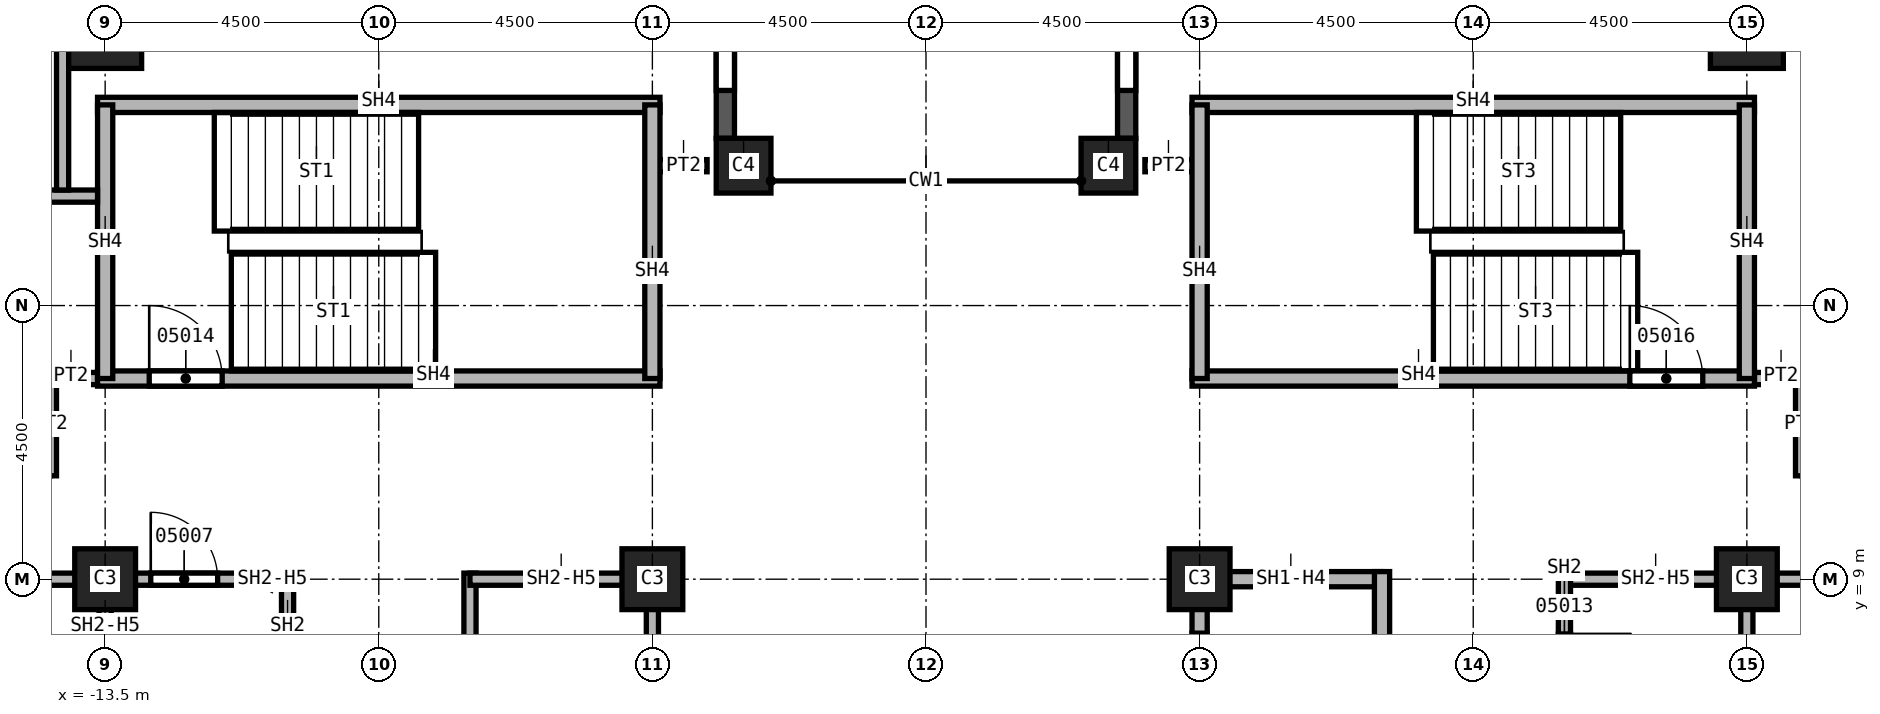
"""IFC4 building model, lengths in metres.
Left out: names, types, materials, properties, quantities, classifications, styles, units other than length and angle.
Written with IfcOpenShell. Run it as: python <this file> out.ifc"""

import sys

from ifc_helpers import new_model, si_unit, direction, frame, frame_2d, origin, origin_2d, place, context, subcontext, project, spatial, rectangle, extrude, element, fill, save


model = new_model("IFC4")
c1 = context("Model", 3, precision=1e-05, world=origin(), true_north=direction((0.0, 1.0)))
c2 = subcontext(c1, "Body", "Model", "MODEL_VIEW")
j1 = project(units=[si_unit("LENGTHUNIT", "METRE"), si_unit("PLANEANGLEUNIT", "RADIAN")], contexts=[c1])
p1 = place(None, origin())
s1 = spatial("IfcSite", under=j1, at=p1, CompositionType="ELEMENT")
p2 = place(p1, origin())
s2 = spatial("IfcBuilding", under=s1, at=p2, CompositionType="ELEMENT")
p3 = place(p2, frame((0.0, 0.0, 112.0)))
s3 = spatial("IfcBuildingStorey", under=s2, at=p3, CompositionType="ELEMENT", Elevation=112.0)
for number, where, z_axis, x_axis in (
    (1, (13.5, 18.0, 0.0), (0.0, 0.0, 1.0), (1.0, 0.0, 0.0)),
    (2, (-13.5, 18.0, 0.0), (0.0, 0.0, 1.0), (1.0, 0.0, 0.0)),
):
    element("IfcColumn", number, at=place(p3, frame(where, z_axis=z_axis, x_axis=x_axis)), inside=s3, PredefinedType="COLUMN", context=c2, shape_type="SweptSolid", body=[
        extrude(rectangle(XDim=1.2, YDim=1.2, at=origin_2d()), origin(), (0.0, 0.0, 1.0), 3.7),
    ])
for number, where, z_axis, x_axis in (
    (3, (4.5, 9.0, 0.0), (0.0, 0.0, 1.0), (1.0, 0.0, 0.0)),
    (4, (13.5, 9.0, 0.0), (0.0, 0.0, 1.0), (1.0, 0.0, 0.0)),
    (5, (-4.5, 9.0, 0.0), (0.0, 0.0, 1.0), (1.0, 0.0, 0.0)),
    (6, (-13.5, 9.0, 0.0), (0.0, 0.0, 1.0), (1.0, 0.0, 0.0)),
):
    element("IfcColumn", number, at=place(p3, frame(where, z_axis=z_axis, x_axis=x_axis)), inside=s3, PredefinedType="COLUMN", context=c2, shape_type="SweptSolid", body=[
        extrude(rectangle(XDim=1.0, YDim=1.0, at=origin_2d()), origin(), (0.0, 0.0, 1.0), 3.7),
    ])
for number, where, z_axis, x_axis in (
    (7, (3.0, 15.8, 0.0), (0.0, 0.0, 1.0), (1.0, 0.0, 0.0)),
    (8, (-3.0, 15.8, 0.0), (0.0, 0.0, 1.0), (1.0, 0.0, 0.0)),
):
    element("IfcColumn", number, at=place(p3, frame(where, z_axis=z_axis, x_axis=x_axis)), inside=s3, PredefinedType="COLUMN", context=c2, shape_type="SweptSolid", body=[
        extrude(rectangle(XDim=0.9, YDim=0.9, at=origin_2d()), origin(), (0.0, 0.0, 1.0), 3.7),
    ])
p4 = place(p3, frame((3.3, 24.2, 0.0), z_axis=(0.0, 0.0, 1.0), x_axis=(0.0, -1.0, 0.0)))
e9 = element("IfcWall", 9, at=p4, inside=s3, PredefinedType="SOLIDWALL", context=c2, shape_type="SweptSolid", body=[
    extrude(rectangle(XDim=7.95, YDim=0.3, at=frame_2d((3.975, 0.0))), origin(), (0.0, 0.0, 1.0), 3.1),
])
p5 = place(p4, frame((0.788, 0.0, 0.8)))
e10 = element("IfcOpeningElement", 10, at=p5, cuts=e9, PredefinedType="OPENING", context=c2, shape_type="SweptSolid", body=[
    extrude(rectangle(XDim=2.4, YDim=1.95, at=frame_2d((1.2, 0.975))), frame((0.0, 0.15, 0.0), z_axis=(0.0, -1.0, 0.0), x_axis=(1.0, 0.0, 0.0)), (0.0, 0.0, 1.0), 0.3),
])
p6 = place(p4, frame((4.762, 0.0, 0.8)))
e11 = element("IfcOpeningElement", 11, at=p6, cuts=e9, PredefinedType="OPENING", context=c2, shape_type="SweptSolid", body=[
    extrude(rectangle(XDim=2.4, YDim=1.95, at=frame_2d((1.2, 0.975))), frame((0.0, 0.15, 0.0), z_axis=(0.0, -1.0, 0.0), x_axis=(1.0, 0.0, 0.0)), (0.0, 0.0, 1.0), 0.3),
])
p7 = place(p3, frame((-3.3, 16.25, 0.0), z_axis=(0.0, 0.0, 1.0), x_axis=(0.0, 1.0, 0.0)))
e12 = element("IfcWall", 12, at=p7, inside=s3, PredefinedType="SOLIDWALL", context=c2, shape_type="SweptSolid", body=[
    extrude(rectangle(XDim=7.95, YDim=0.3, at=frame_2d((3.975, 0.0))), origin(), (0.0, 0.0, 1.0), 3.1),
])
p8 = place(p7, frame((0.788, 0.0, 0.8)))
e13 = element("IfcOpeningElement", 13, at=p8, cuts=e12, PredefinedType="OPENING", context=c2, shape_type="SweptSolid", body=[
    extrude(rectangle(XDim=2.4, YDim=1.95, at=frame_2d((1.2, 0.975))), frame((0.0, 0.15, 0.0), z_axis=(0.0, -1.0, 0.0), x_axis=(1.0, 0.0, 0.0)), (0.0, 0.0, 1.0), 0.3),
])
p9 = place(p7, frame((4.762, 0.0, 0.8)))
e14 = element("IfcOpeningElement", 14, at=p9, cuts=e12, PredefinedType="OPENING", context=c2, shape_type="SweptSolid", body=[
    extrude(rectangle(XDim=2.4, YDim=1.95, at=frame_2d((1.2, 0.975))), frame((0.0, 0.15, 0.0), z_axis=(0.0, -1.0, 0.0), x_axis=(1.0, 0.0, 0.0)), (0.0, 0.0, 1.0), 0.3),
])
p10 = place(p3, frame((-14.5, 12.3, 0.0), z_axis=(0.0, 0.0, 1.0), x_axis=(1.0, 0.0, 0.0)))
e15 = element("IfcWall", 15, at=p10, inside=s3, PredefinedType="PARTITIONING", context=c2, shape_type="SweptSolid", body=[
    extrude(rectangle(XDim=1.125, YDim=0.2, at=frame_2d((0.562, 0.0))), origin(), (0.0, 0.0, 1.0), 3.7),
])
p11 = place(p3, frame((-13.5, 9.0, 0.0), z_axis=(0.0, 0.0, 1.0), x_axis=(-1.0, 0.0, 0.0)))
e16 = element("IfcWall", 16, at=p11, inside=s3, PredefinedType="PARTITIONING", context=c2, shape_type="SweptSolid", body=[
    extrude(rectangle(XDim=4.5, YDim=0.2, at=frame_2d((2.25, 0.0))), origin(), (0.0, 0.0, 1.0), 3.7),
])
p12 = place(p3, frame((-14.4, 10.7, 0.0), z_axis=(0.0, 0.0, 1.0), x_axis=(0.0, 1.0, 0.0)))
e17 = element("IfcWall", 17, at=p12, inside=s3, PredefinedType="PARTITIONING", context=c2, shape_type="SweptSolid", body=[
    extrude(rectangle(XDim=1.6, YDim=0.2, at=frame_2d((0.8, 0.0))), origin(), (0.0, 0.0, 1.0), 3.7),
])
for number, where, z_axis, x_axis in (
    (18, (-4.5, 15.8, 0.0), (0.0, 0.0, 1.0), (1.0, 0.0, 0.0)),
    (19, (3.6, 15.8, 0.0), (0.0, 0.0, 1.0), (1.0, 0.0, 0.0)),
):
    element("IfcWall", number, at=place(p3, frame(where, z_axis=z_axis, x_axis=x_axis)), inside=s3, PredefinedType="PARTITIONING", context=c2, shape_type="SweptSolid", body=[
        extrude(rectangle(XDim=0.9, YDim=0.2, at=frame_2d((0.45, 0.0))), origin(), (0.0, 0.0, 1.0), 3.7),
    ])
p13 = place(p3, frame((13.375, 12.3, 0.0), z_axis=(0.0, 0.0, 1.0), x_axis=(1.0, 0.0, 0.0)))
e20 = element("IfcWall", 20, at=p13, inside=s3, PredefinedType="PARTITIONING", context=c2, shape_type="SweptSolid", body=[
    extrude(rectangle(XDim=1.125, YDim=0.2, at=frame_2d((0.562, 0.0))), origin(), (0.0, 0.0, 1.0), 3.7),
])
p14 = place(p3, frame((18.0, 9.0, 0.0), z_axis=(0.0, 0.0, 1.0), x_axis=(-1.0, 0.0, 0.0)))
e21 = element("IfcWall", 21, at=p14, inside=s3, PredefinedType="PARTITIONING", context=c2, shape_type="SweptSolid", body=[
    extrude(rectangle(XDim=4.5, YDim=0.2, at=frame_2d((2.25, 0.0))), origin(), (0.0, 0.0, 1.0), 3.7),
])
p15 = place(p3, frame((14.4, 12.3, 0.0), z_axis=(0.0, 0.0, 1.0), x_axis=(0.0, -1.0, 0.0)))
e22 = element("IfcWall", 22, at=p15, inside=s3, PredefinedType="PARTITIONING", context=c2, shape_type="SweptSolid", body=[
    extrude(rectangle(XDim=1.6, YDim=0.2, at=frame_2d((0.8, 0.0))), origin(), (0.0, 0.0, 1.0), 3.7),
])
p16 = place(p3, frame((-13.6, 9.0, 0.0), z_axis=(0.0, 0.0, 1.0), x_axis=(1.0, 0.0, 0.0)))
e23 = element("IfcWall", 23, at=p16, inside=s3, PredefinedType="SOLIDWALL", context=c2, shape_type="SweptSolid", body=[
    extrude(rectangle(XDim=3.1, YDim=0.2, at=frame_2d((1.55, 0.0))), origin(), (0.0, 0.0, 1.0), 2.938),
])
p17 = place(p16, frame((0.85, 0.0, 0.0)))
e24 = element("IfcOpeningElement", 24, at=p17, cuts=e23, PredefinedType="OPENING", context=c2, shape_type="SweptSolid", body=[
    extrude(rectangle(XDim=1.1, YDim=2.1, at=frame_2d((0.55, 1.05))), frame((0.0, 0.1, 0.0), z_axis=(0.0, -1.0, 0.0), x_axis=(1.0, 0.0, 0.0)), (0.0, 0.0, 1.0), 0.2),
])
p18 = place(p3, frame((-13.5, 7.5, 0.0), z_axis=(0.0, 0.0, 1.0), x_axis=(0.0, 1.0, 0.0)))
e25 = element("IfcWall", 25, at=p18, inside=s3, PredefinedType="SOLIDWALL", context=c2, shape_type="SweptSolid", body=[
    extrude(rectangle(XDim=1.6, YDim=0.2, at=frame_2d((0.8, 0.0))), origin(), (0.0, 0.0, 1.0), 2.938),
])
p19 = place(p3, frame((-10.5, 7.425, 0.0), z_axis=(0.0, 0.0, 1.0), x_axis=(0.0, 1.0, 0.0)))
e26 = element("IfcWall", 26, at=p19, inside=s3, PredefinedType="SOLIDWALL", context=c2, shape_type="SweptSolid", body=[
    extrude(rectangle(XDim=1.675, YDim=0.2, at=frame_2d((0.837, 0.0))), origin(), (0.0, 0.0, 1.0), 3.7),
])
p20 = place(p3, frame((-7.5, 2.875, 0.0), z_axis=(0.0, 0.0, 1.0), x_axis=(0.0, 1.0, 0.0)))
e27 = element("IfcWall", 27, at=p20, inside=s3, PredefinedType="SOLIDWALL", context=c2, shape_type="SweptSolid", body=[
    extrude(rectangle(XDim=6.225, YDim=0.2, at=frame_2d((3.113, 0.0))), origin(), (0.0, 0.0, 1.0), 3.7),
])
p21 = place(p3, frame((-7.5, 9.0, 0.0), z_axis=(0.0, 0.0, 1.0), x_axis=(1.0, 0.0, 0.0)))
e28 = element("IfcWall", 28, at=p21, inside=s3, PredefinedType="SOLIDWALL", context=c2, shape_type="SweptSolid", body=[
    extrude(rectangle(XDim=3.0, YDim=0.2, at=frame_2d((1.5, 0.0))), origin(), (0.0, 0.0, 1.0), 2.938),
])
p22 = place(p3, frame((-4.5, 9.1, 0.0), z_axis=(0.0, 0.0, 1.0), x_axis=(0.0, -1.0, 0.0)))
e29 = element("IfcWall", 29, at=p22, inside=s3, PredefinedType="SOLIDWALL", context=c2, shape_type="SweptSolid", body=[
    extrude(rectangle(XDim=9.1, YDim=0.2, at=frame_2d((4.55, 0.0))), origin(), (0.0, 0.0, 1.0), 2.938),
])
p23 = place(p22, frame((4.9, 0.0, 0.0)))
e30 = element("IfcOpeningElement", 30, at=p23, cuts=e29, PredefinedType="OPENING", context=c2, shape_type="SweptSolid", body=[
    extrude(rectangle(XDim=1.1, YDim=2.1, at=frame_2d((0.55, 1.05))), frame((0.0, 0.1, 0.0), z_axis=(0.0, -1.0, 0.0), x_axis=(1.0, 0.0, 0.0)), (0.0, 0.0, 1.0), 0.2),
])
p24 = place(p3, frame((10.5, 9.0, 0.0), z_axis=(0.0, 0.0, 1.0), x_axis=(1.0, 0.0, 0.0)))
e31 = element("IfcWall", 31, at=p24, inside=s3, PredefinedType="SOLIDWALL", context=c2, shape_type="SweptSolid", body=[
    extrude(rectangle(XDim=3.1, YDim=0.2, at=frame_2d((1.55, 0.0))), origin(), (0.0, 0.0, 1.0), 2.938),
])
p25 = place(p3, frame((10.5, 9.1, 0.0), z_axis=(0.0, 0.0, 1.0), x_axis=(0.0, -1.0, 0.0)))
e32 = element("IfcWall", 32, at=p25, inside=s3, PredefinedType="SOLIDWALL", context=c2, shape_type="SweptSolid", body=[
    extrude(rectangle(XDim=3.225, YDim=0.2, at=frame_2d((1.613, 0.0))), origin(), (0.0, 0.0, 1.0), 3.7),
])
p26 = place(p25, frame((1.0, 0.0, 0.0)))
e33 = element("IfcOpeningElement", 33, at=p26, cuts=e32, PredefinedType="OPENING", context=c2, shape_type="SweptSolid", body=[
    extrude(rectangle(XDim=1.1, YDim=2.1, at=frame_2d((0.55, 1.05))), frame((0.0, 0.1, 0.0), z_axis=(0.0, -1.0, 0.0), x_axis=(1.0, 0.0, 0.0)), (0.0, 0.0, 1.0), 0.2),
])
p27 = place(p3, frame((13.5, 9.1, 0.0), z_axis=(0.0, 0.0, 1.0), x_axis=(0.0, -1.0, 0.0)))
e34 = element("IfcWall", 34, at=p27, inside=s3, PredefinedType="SOLIDWALL", context=c2, shape_type="SweptSolid", body=[
    extrude(rectangle(XDim=3.1, YDim=0.2, at=frame_2d((1.55, 0.0))), origin(), (0.0, 0.0, 1.0), 2.938),
])
p28 = place(p3, frame((4.5, 0.0, 0.0), z_axis=(0.0, 0.0, 1.0), x_axis=(0.0, 1.0, 0.0)))
e35 = element("IfcWall", 35, at=p28, inside=s3, PredefinedType="SOLIDWALL", context=c2, shape_type="SweptSolid", body=[
    extrude(rectangle(XDim=9.125, YDim=0.25, at=frame_2d((4.562, 0.0))), origin(), (0.0, 0.0, 1.0), 2.938),
])
p29 = place(p28, frame((0.95, 0.0, 0.0)))
e36 = element("IfcOpeningElement", 36, at=p29, cuts=e35, PredefinedType="OPENING", context=c2, shape_type="SweptSolid", body=[
    extrude(rectangle(XDim=1.1, YDim=2.1, at=frame_2d((0.55, 1.05))), frame((0.0, 0.125, 0.0), z_axis=(0.0, -1.0, 0.0), x_axis=(1.0, 0.0, 0.0)), (0.0, 0.0, 1.0), 0.25),
])
p30 = place(p28, frame((3.95, 0.0, 0.0)))
e37 = element("IfcOpeningElement", 37, at=p30, cuts=e35, PredefinedType="OPENING", context=c2, shape_type="SweptSolid", body=[
    extrude(rectangle(XDim=1.1, YDim=2.1, at=frame_2d((0.55, 1.05))), frame((0.0, 0.125, 0.0), z_axis=(0.0, -1.0, 0.0), x_axis=(1.0, 0.0, 0.0)), (0.0, 0.0, 1.0), 0.25),
])
p31 = place(p28, frame((7.012, 0.0, 0.0)))
e38 = element("IfcOpeningElement", 38, at=p31, cuts=e35, PredefinedType="OPENING", context=c2, shape_type="SweptSolid", body=[
    extrude(rectangle(XDim=1.1, YDim=2.1, at=frame_2d((0.55, 1.05))), frame((0.0, 0.125, 0.0), z_axis=(0.0, -1.0, 0.0), x_axis=(1.0, 0.0, 0.0)), (0.0, 0.0, 1.0), 0.25),
])
p32 = place(p3, frame((4.5, 9.0, 0.0), z_axis=(0.0, 0.0, 1.0), x_axis=(1.0, 0.0, 0.0)))
e39 = element("IfcWall", 39, at=p32, inside=s3, PredefinedType="SOLIDWALL", context=c2, shape_type="SweptSolid", body=[
    extrude(rectangle(XDim=3.0, YDim=0.25, at=frame_2d((1.5, 0.0))), origin(), (0.0, 0.0, 1.0), 2.938),
])
p33 = place(p3, frame((7.5, 9.125, 0.0), z_axis=(0.0, 0.0, 1.0), x_axis=(0.0, -1.0, 0.0)))
e40 = element("IfcWall", 40, at=p33, inside=s3, PredefinedType="SOLIDWALL", context=c2, shape_type="SweptSolid", body=[
    extrude(rectangle(XDim=12.25, YDim=0.25, at=frame_2d((6.125, 0.0))), origin(), (0.0, 0.0, 1.0), 3.7),
])
p34 = place(p3, frame((-13.625, 12.3, 0.0), z_axis=(0.0, 0.0, 1.0), x_axis=(1.0, 0.0, 0.0)))
e41 = element("IfcWall", 41, at=p34, inside=s3, PredefinedType="SOLIDWALL", context=c2, shape_type="SweptSolid", body=[
    extrude(rectangle(XDim=9.25, YDim=0.25, at=frame_2d((4.625, 0.0))), origin(), (0.0, 0.0, 1.0), 3.7),
])
p35 = place(p34, frame((0.85, 0.0, 0.0)))
e42 = element("IfcOpeningElement", 42, at=p35, cuts=e41, PredefinedType="OPENING", context=c2, shape_type="SweptSolid", body=[
    extrude(rectangle(XDim=1.2, YDim=2.1, at=frame_2d((0.6, 1.05))), frame((0.0, 0.125, 0.0), z_axis=(0.0, -1.0, 0.0), x_axis=(1.0, 0.0, 0.0)), (0.0, 0.0, 1.0), 0.25),
])
p36 = place(p3, frame((-13.625, 16.8, 0.0), z_axis=(0.0, 0.0, 1.0), x_axis=(1.0, 0.0, 0.0)))
e43 = element("IfcWall", 43, at=p36, inside=s3, PredefinedType="SOLIDWALL", context=c2, shape_type="SweptSolid", body=[
    extrude(rectangle(XDim=9.25, YDim=0.25, at=frame_2d((4.625, 0.0))), origin(), (0.0, 0.0, 1.0), 3.7),
])
for number, where, z_axis, x_axis in (
    (44, (-13.5, 12.3, 0.0), (0.0, 0.0, 1.0), (0.0, 1.0, 0.0)),
    (45, (-4.5, 16.8, 0.0), (0.0, 0.0, 1.0), (0.0, -1.0, 0.0)),
):
    element("IfcWall", number, at=place(p3, frame(where, z_axis=z_axis, x_axis=x_axis)), inside=s3, PredefinedType="SOLIDWALL", context=c2, shape_type="SweptSolid", body=[
        extrude(rectangle(XDim=4.5, YDim=0.25, at=frame_2d((2.25, 0.0))), origin(), (0.0, 0.0, 1.0), 3.7),
    ])
p37 = place(p3, frame((4.375, 12.3, 0.0), z_axis=(0.0, 0.0, 1.0), x_axis=(1.0, 0.0, 0.0)))
e46 = element("IfcWall", 46, at=p37, inside=s3, PredefinedType="SOLIDWALL", context=c2, shape_type="SweptSolid", body=[
    extrude(rectangle(XDim=9.25, YDim=0.25, at=frame_2d((4.625, 0.0))), origin(), (0.0, 0.0, 1.0), 3.7),
])
p38 = place(p37, frame((7.2, 0.0, 0.0)))
e47 = element("IfcOpeningElement", 47, at=p38, cuts=e46, PredefinedType="OPENING", context=c2, shape_type="SweptSolid", body=[
    extrude(rectangle(XDim=1.2, YDim=2.1, at=frame_2d((0.6, 1.05))), frame((0.0, 0.125, 0.0), z_axis=(0.0, -1.0, 0.0), x_axis=(1.0, 0.0, 0.0)), (0.0, 0.0, 1.0), 0.25),
])
p39 = place(p3, frame((4.375, 16.8, 0.0), z_axis=(0.0, 0.0, 1.0), x_axis=(1.0, 0.0, 0.0)))
e48 = element("IfcWall", 48, at=p39, inside=s3, PredefinedType="SOLIDWALL", context=c2, shape_type="SweptSolid", body=[
    extrude(rectangle(XDim=9.25, YDim=0.25, at=frame_2d((4.625, 0.0))), origin(), (0.0, 0.0, 1.0), 3.7),
])
for number, where, z_axis, x_axis in (
    (49, (4.5, 12.3, 0.0), (0.0, 0.0, 1.0), (0.0, 1.0, 0.0)),
    (50, (13.5, 16.8, 0.0), (0.0, 0.0, 1.0), (0.0, -1.0, 0.0)),
):
    element("IfcWall", number, at=place(p3, frame(where, z_axis=z_axis, x_axis=x_axis)), inside=s3, PredefinedType="SOLIDWALL", context=c2, shape_type="SweptSolid", body=[
        extrude(rectangle(XDim=4.5, YDim=0.25, at=frame_2d((2.25, 0.0))), origin(), (0.0, 0.0, 1.0), 3.7),
    ])
p40 = place(p3, frame((-21.9, 15.3, 0.0), z_axis=(0.0, 0.0, 1.0), x_axis=(1.0, 0.0, 0.0)))
e51 = element("IfcWall", 51, at=p40, inside=s3, PredefinedType="SOLIDWALL", context=c2, shape_type="SweptSolid", body=[
    extrude(rectangle(XDim=8.275, YDim=0.2, at=frame_2d((4.137, 0.0))), origin(), (0.0, 0.0, 1.0), 3.7),
])
p41 = place(p40, frame((4.8, 0.0, 0.0)))
e52 = element("IfcOpeningElement", 52, at=p41, cuts=e51, PredefinedType="OPENING", context=c2, shape_type="SweptSolid", body=[
    extrude(rectangle(XDim=1.2, YDim=2.1, at=frame_2d((0.6, 1.05))), frame((0.0, 0.1, 0.0), z_axis=(0.0, -1.0, 0.0), x_axis=(1.0, 0.0, 0.0)), (0.0, 0.0, 1.0), 0.2),
])
p42 = place(p3, frame((-14.2, 15.4, 0.0), z_axis=(0.0, 0.0, 1.0), x_axis=(0.0, 1.0, 0.0)))
e53 = element("IfcWall", 53, at=p42, inside=s3, PredefinedType="SOLIDWALL", context=c2, shape_type="SweptSolid", body=[
    extrude(rectangle(XDim=5.9, YDim=0.2, at=frame_2d((2.95, 0.0))), origin(), (0.0, 0.0, 1.0), 3.7),
])
p43 = place(p6, origin())
e54 = element("IfcWindow", 54, at=p43, inside=s3, PartitioningType="SINGLE_PANEL", PredefinedType="WINDOW", context=c2, shape_type="SweptSolid", body=[
    extrude(rectangle(XDim=2.4, YDim=1.95, at=frame_2d((1.2, 0.975))), frame((0.0, 0.03, 0.0), z_axis=(0.0, -1.0, 0.0), x_axis=(1.0, 0.0, 0.0)), (0.0, 0.0, 1.0), 0.06),
])
fill(e11, e54)
p44 = place(p8, origin())
e55 = element("IfcWindow", 55, at=p44, inside=s3, PartitioningType="SINGLE_PANEL", PredefinedType="WINDOW", context=c2, shape_type="SweptSolid", body=[
    extrude(rectangle(XDim=2.4, YDim=1.95, at=frame_2d((1.2, 0.975))), frame((0.0, 0.03, 0.0), z_axis=(0.0, -1.0, 0.0), x_axis=(1.0, 0.0, 0.0)), (0.0, 0.0, 1.0), 0.06),
])
fill(e13, e55)
p45 = place(p17, origin())
e56 = element("IfcDoor", 56, at=p45, inside=s3, OperationType="SINGLE_SWING_RIGHT", PredefinedType="DOOR", context=c2, shape_type="SweptSolid", body=[
    extrude(rectangle(XDim=1.1, YDim=2.1, at=frame_2d((0.55, 1.05))), frame((0.0, 0.025, 0.0), z_axis=(0.0, -1.0, 0.0), x_axis=(1.0, 0.0, 0.0)), (0.0, 0.0, 1.0), 0.05),
])
fill(e24, e56)
p46 = place(p35, origin())
e57 = element("IfcDoor", 57, at=p46, inside=s3, OperationType="SINGLE_SWING_LEFT", PredefinedType="DOOR", context=c2, shape_type="SweptSolid", body=[
    extrude(rectangle(XDim=1.2, YDim=2.1, at=frame_2d((0.6, 1.05))), frame((0.0, 0.025, 0.0), z_axis=(0.0, -1.0, 0.0), x_axis=(1.0, 0.0, 0.0)), (0.0, 0.0, 1.0), 0.05),
])
fill(e42, e57)
p47 = place(p38, origin())
e58 = element("IfcDoor", 58, at=p47, inside=s3, OperationType="SINGLE_SWING_LEFT", PredefinedType="DOOR", context=c2, shape_type="SweptSolid", body=[
    extrude(rectangle(XDim=1.2, YDim=2.1, at=frame_2d((0.6, 1.05))), frame((0.0, 0.025, 0.0), z_axis=(0.0, -1.0, 0.0), x_axis=(1.0, 0.0, 0.0)), (0.0, 0.0, 1.0), 0.05),
])
fill(e47, e58)
p48 = place(p31, origin())
e59 = element("IfcDoor", 59, at=p48, inside=s3, OperationType="SLIDING_TO_LEFT", PredefinedType="DOOR", context=c2, shape_type="SweptSolid", body=[
    extrude(rectangle(XDim=1.1, YDim=2.1, at=frame_2d((0.55, 1.05))), frame((0.0, 0.025, 0.0), z_axis=(0.0, -1.0, 0.0), x_axis=(1.0, 0.0, 0.0)), (0.0, 0.0, 1.0), 0.05),
])
fill(e38, e59)
save(model, sys.argv[1])
